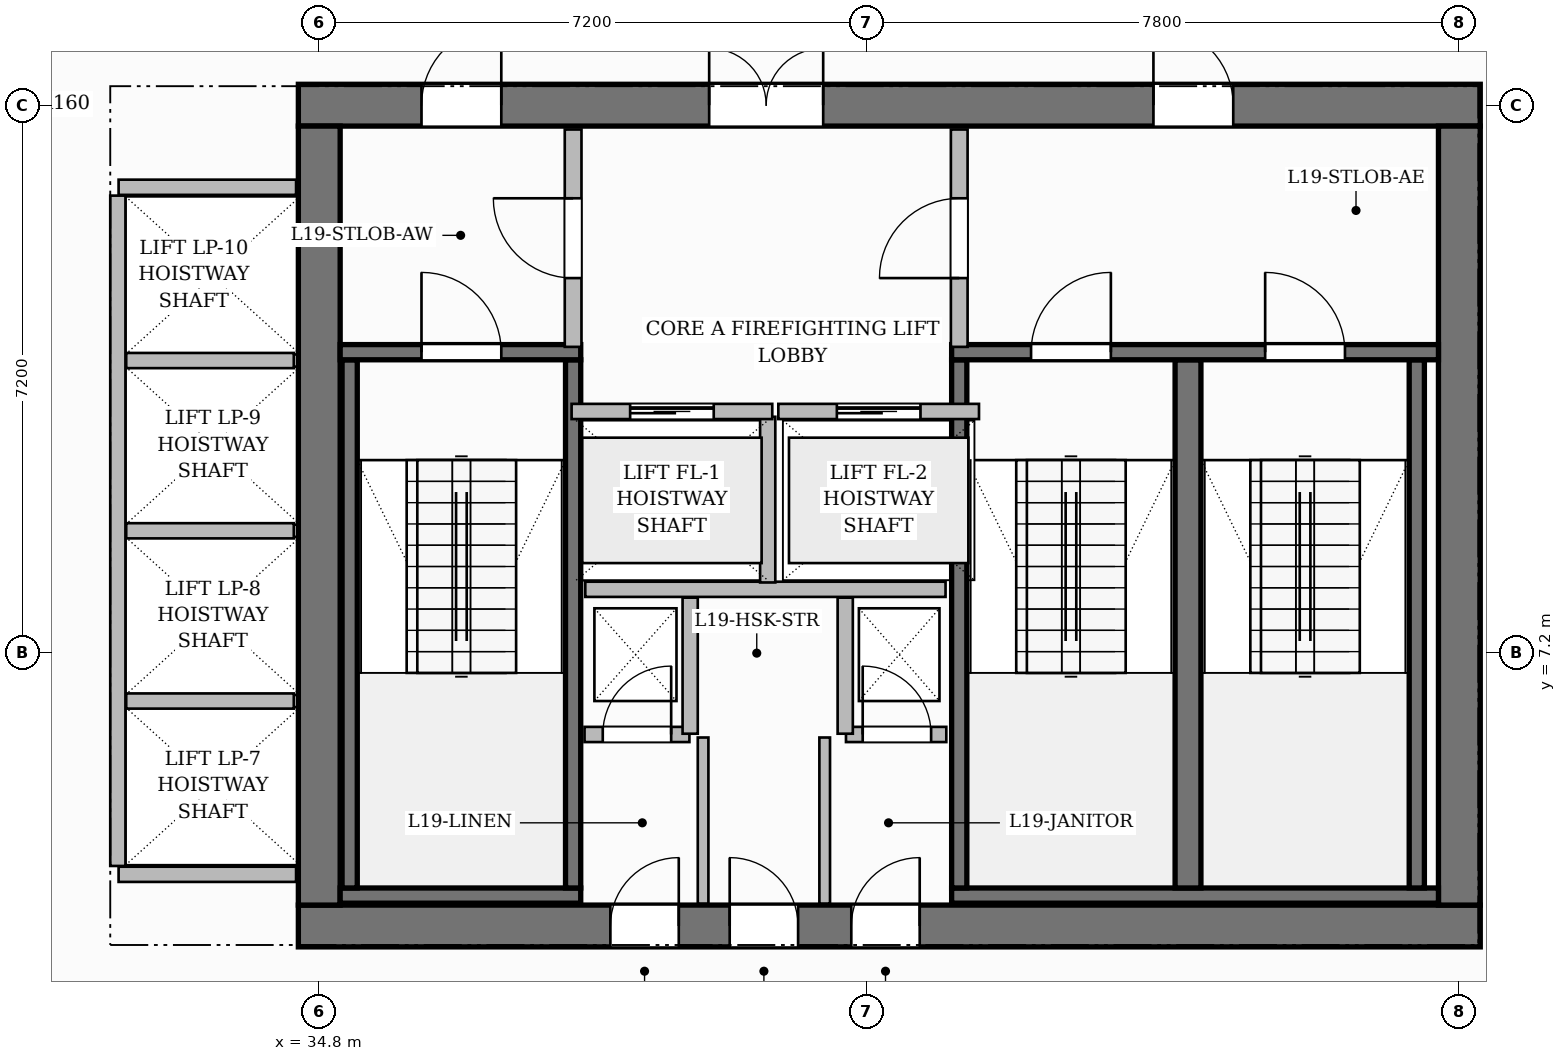
"""IFC4 building model, lengths in metres.
Left out: names, types, materials, properties, quantities, classifications, styles, units other than length and angle.
Written with IfcOpenShell. Run it as: python <this file> out.ifc"""

import sys

from ifc_helpers import new_model, si_unit, direction, frame, frame_2d, origin, place, context, subcontext, project, spatial, rectangle, extrude, source, transform, mapped, element, fill, save


model = new_model("IFC4")
c1 = context("Model", 3, precision=1e-05, world=origin(), true_north=direction((0.0, 1.0)))
c2 = subcontext(c1, "Body", "Model", "MODEL_VIEW")
j1 = project(units=[si_unit("LENGTHUNIT", "METRE"), si_unit("PLANEANGLEUNIT", "RADIAN")], contexts=[c1])
p1 = place(None, origin())
s1 = spatial("IfcSite", under=j1, at=p1, CompositionType="ELEMENT")
p2 = place(p1, origin())
s2 = spatial("IfcBuilding", under=s1, at=p2, CompositionType="ELEMENT")
p3 = place(p2, frame((0.0, 0.0, 80.5)))
s3 = spatial("IfcBuildingStorey", under=s2, at=p3, CompositionType="ELEMENT", Elevation=80.5)
p4 = place(p3, frame((34.525, 3.6, 0.0), z_axis=(0.0, 0.0, 1.0), x_axis=(1.0, 0.0, 0.0)))
e1 = element("IfcWall", 1, at=p4, inside=s3, PredefinedType="SHEAR", context=c2, shape_type="SweptSolid", body=[
    extrude(rectangle(XDim=15.55, YDim=0.55, at=frame_2d((7.775, 0.0))), origin(), (0.0, 0.0, 1.0), 3.7),
])
p5 = place(p4, frame((4.105, 0.0, 0.0)))
e2 = element("IfcOpeningElement", 2, at=p5, cuts=e1, PredefinedType="OPENING", context=c2, shape_type="SweptSolid", body=[
    extrude(rectangle(XDim=0.9, YDim=2.1, at=frame_2d((0.45, 1.05))), frame((0.0, 0.285, 0.0), z_axis=(0.0, -1.0, 0.0), x_axis=(1.0, 0.0, 0.0)), (0.0, 0.0, 1.0), 0.57),
])
p6 = place(p4, frame((5.675, 0.0, 0.0)))
e3 = element("IfcOpeningElement", 3, at=p6, cuts=e1, PredefinedType="OPENING", context=c2, shape_type="SweptSolid", body=[
    extrude(rectangle(XDim=0.9, YDim=2.1, at=frame_2d((0.45, 1.05))), frame((0.0, 0.285, 0.0), z_axis=(0.0, -1.0, 0.0), x_axis=(1.0, 0.0, 0.0)), (0.0, 0.0, 1.0), 0.57),
])
p7 = place(p4, frame((7.275, 0.0, 0.0)))
e4 = element("IfcOpeningElement", 4, at=p7, cuts=e1, PredefinedType="OPENING", context=c2, shape_type="SweptSolid", body=[
    extrude(rectangle(XDim=0.9, YDim=2.1, at=frame_2d((0.45, 1.05))), frame((0.0, 0.285, 0.0), z_axis=(0.0, -1.0, 0.0), x_axis=(1.0, 0.0, 0.0)), (0.0, 0.0, 1.0), 0.57),
])
p8 = place(p3, frame((34.525, 14.4, 0.0), z_axis=(0.0, 0.0, 1.0), x_axis=(1.0, 0.0, 0.0)))
e5 = element("IfcWall", 5, at=p8, inside=s3, PredefinedType="SHEAR", context=c2, shape_type="SweptSolid", body=[
    extrude(rectangle(XDim=15.55, YDim=0.55, at=frame_2d((7.775, 0.0))), origin(), (0.0, 0.0, 1.0), 3.7),
])
p9 = place(p8, frame((5.405, 0.0, 0.0)))
e6 = element("IfcOpeningElement", 6, at=p9, cuts=e5, PredefinedType="OPENING", context=c2, shape_type="SweptSolid", body=[
    extrude(rectangle(XDim=1.5, YDim=2.2, at=frame_2d((0.75, 1.1))), frame((0.0, 0.285, 0.0), z_axis=(0.0, -1.0, 0.0), x_axis=(1.0, 0.0, 0.0)), (0.0, 0.0, 1.0), 0.57),
])
p10 = place(p8, frame((1.62, 0.0, 0.0)))
e7 = element("IfcOpeningElement", 7, at=p10, cuts=e5, PredefinedType="OPENING", context=c2, shape_type="SweptSolid", body=[
    extrude(rectangle(XDim=1.05, YDim=2.15, at=frame_2d((0.525, 1.075))), frame((0.0, 0.285, 0.0), z_axis=(0.0, -1.0, 0.0), x_axis=(1.0, 0.0, 0.0)), (0.0, 0.0, 1.0), 0.57),
])
p11 = place(p8, frame((11.25, 0.0, 0.0)))
e8 = element("IfcOpeningElement", 8, at=p11, cuts=e5, PredefinedType="OPENING", context=c2, shape_type="SweptSolid", body=[
    extrude(rectangle(XDim=1.05, YDim=2.15, at=frame_2d((0.525, 1.075))), frame((0.0, 0.285, 0.0), z_axis=(0.0, -1.0, 0.0), x_axis=(1.0, 0.0, 0.0)), (0.0, 0.0, 1.0), 0.57),
])
for number, where, z_axis, x_axis in (
    (9, (34.8, 3.875, 0.0), (0.0, 0.0, 1.0), (0.0, 1.0, 0.0)),
    (10, (49.8, 3.875, 0.0), (0.0, 0.0, 1.0), (0.0, 1.0, 0.0)),
):
    element("IfcWall", number, at=place(p3, frame(where, z_axis=z_axis, x_axis=x_axis)), inside=s3, PredefinedType="SHEAR", context=c2, shape_type="SweptSolid", body=[
        extrude(rectangle(XDim=10.25, YDim=0.55, at=frame_2d((5.125, 0.0))), origin(), (0.0, 0.0, 1.0), 3.7),
    ])
p12 = place(p3, frame((35.075, 4.0, 0.0), z_axis=(0.0, 0.0, 1.0), x_axis=(1.0, 0.0, 0.0)))
e11 = element("IfcWall", 11, at=p12, inside=s3, PredefinedType="SHEAR", context=c2, shape_type="SweptSolid", body=[
    extrude(rectangle(XDim=3.165, YDim=0.2, at=frame_2d((1.583, 0.0))), origin(), (0.0, 0.0, 1.0), 3.7),
])
for number, where, z_axis, x_axis in (
    (12, (35.2, 4.1, 0.0), (0.0, 0.0, 1.0), (0.0, 1.0, 0.0)),
    (13, (38.14, 4.1, 0.0), (0.0, 0.0, 1.0), (0.0, 1.0, 0.0)),
):
    element("IfcWall", number, at=place(p3, frame(where, z_axis=z_axis, x_axis=x_axis)), inside=s3, PredefinedType="SHEAR", context=c2, shape_type="SweptSolid", body=[
        extrude(rectangle(XDim=6.95, YDim=0.2, at=frame_2d((3.475, 0.0))), origin(), (0.0, 0.0, 1.0), 3.7),
    ])
p13 = place(p3, frame((35.075, 11.15, 0.0), z_axis=(0.0, 0.0, 1.0), x_axis=(1.0, 0.0, 0.0)))
e14 = element("IfcWall", 14, at=p13, inside=s3, PredefinedType="SHEAR", context=c2, shape_type="SweptSolid", body=[
    extrude(rectangle(XDim=3.165, YDim=0.2, at=frame_2d((1.583, 0.0))), origin(), (0.0, 0.0, 1.0), 3.7),
])
p14 = place(p13, frame((1.07, 0.0, 0.0)))
e15 = element("IfcOpeningElement", 15, at=p14, cuts=e14, PredefinedType="OPENING", context=c2, shape_type="SweptSolid", body=[
    extrude(rectangle(XDim=1.05, YDim=2.2, at=frame_2d((0.525, 1.1))), frame((0.0, 0.11, 0.0), z_axis=(0.0, -1.0, 0.0), x_axis=(1.0, 0.0, 0.0)), (0.0, 0.0, 1.0), 0.22),
])
p15 = place(p3, frame((43.12, 4.0, 0.0), z_axis=(0.0, 0.0, 1.0), x_axis=(1.0, 0.0, 0.0)))
e16 = element("IfcWall", 16, at=p15, inside=s3, PredefinedType="SHEAR", context=c2, shape_type="SweptSolid", body=[
    extrude(rectangle(XDim=6.405, YDim=0.2, at=frame_2d((3.202, 0.0))), origin(), (0.0, 0.0, 1.0), 3.7),
])
p16 = place(p3, frame((43.22, 4.1, 0.0), z_axis=(0.0, 0.0, 1.0), x_axis=(0.0, 1.0, 0.0)))
e17 = element("IfcWall", 17, at=p16, inside=s3, PredefinedType="SHEAR", context=c2, shape_type="SweptSolid", body=[
    extrude(rectangle(XDim=6.95, YDim=0.2, at=frame_2d((3.475, 0.0))), origin(), (0.0, 0.0, 1.0), 3.7),
])
p17 = place(p3, frame((46.23, 4.1, 0.0), z_axis=(0.0, 0.0, 1.0), x_axis=(0.0, 1.0, 0.0)))
e18 = element("IfcWall", 18, at=p17, inside=s3, PredefinedType="SHEAR", context=c2, shape_type="SweptSolid", body=[
    extrude(rectangle(XDim=6.95, YDim=0.34, at=frame_2d((3.475, 0.0))), origin(), (0.0, 0.0, 1.0), 3.7),
])
p18 = place(p3, frame((49.24, 4.1, 0.0), z_axis=(0.0, 0.0, 1.0), x_axis=(0.0, 1.0, 0.0)))
e19 = element("IfcWall", 19, at=p18, inside=s3, PredefinedType="SHEAR", context=c2, shape_type="SweptSolid", body=[
    extrude(rectangle(XDim=6.95, YDim=0.2, at=frame_2d((3.475, 0.0))), origin(), (0.0, 0.0, 1.0), 3.7),
])
p19 = place(p3, frame((43.12, 11.15, 0.0), z_axis=(0.0, 0.0, 1.0), x_axis=(1.0, 0.0, 0.0)))
e20 = element("IfcWall", 20, at=p19, inside=s3, PredefinedType="SHEAR", context=c2, shape_type="SweptSolid", body=[
    extrude(rectangle(XDim=6.405, YDim=0.2, at=frame_2d((3.202, 0.0))), origin(), (0.0, 0.0, 1.0), 3.7),
])
p20 = place(p19, frame((1.045, 0.0, 0.0)))
e21 = element("IfcOpeningElement", 21, at=p20, cuts=e20, PredefinedType="OPENING", context=c2, shape_type="SweptSolid", body=[
    extrude(rectangle(XDim=1.05, YDim=2.2, at=frame_2d((0.525, 1.1))), frame((0.0, 0.11, 0.0), z_axis=(0.0, -1.0, 0.0), x_axis=(1.0, 0.0, 0.0)), (0.0, 0.0, 1.0), 0.22),
])
p21 = place(p19, frame((4.125, 0.0, 0.0)))
e22 = element("IfcOpeningElement", 22, at=p21, cuts=e20, PredefinedType="OPENING", context=c2, shape_type="SweptSolid", body=[
    extrude(rectangle(XDim=1.05, YDim=2.2, at=frame_2d((0.525, 1.1))), frame((0.0, 0.11, 0.0), z_axis=(0.0, -1.0, 0.0), x_axis=(1.0, 0.0, 0.0)), (0.0, 0.0, 1.0), 0.22),
])
p22 = place(p3, frame((38.3, 8.03, 0.0), z_axis=(0.0, 0.0, 1.0), x_axis=(1.0, 0.0, 0.0)))
e23 = element("IfcWall", 23, at=p22, inside=s3, PredefinedType="PARTITIONING", context=c2, shape_type="SweptSolid", body=[
    extrude(rectangle(XDim=4.74, YDim=0.2, at=frame_2d((2.37, 0.0))), origin(), (0.0, 0.0, 1.0), 3.45),
])
p23 = place(p3, frame((40.7, 8.12, 0.0), z_axis=(0.0, 0.0, 1.0), x_axis=(0.0, 1.0, 0.0)))
e24 = element("IfcWall", 24, at=p23, inside=s3, PredefinedType="PARTITIONING", context=c2, shape_type="SweptSolid", body=[
    extrude(rectangle(XDim=2.18, YDim=0.2, at=frame_2d((1.09, 0.0))), origin(), (0.0, 0.0, 1.0), 3.45),
])
p24 = place(p3, frame((38.14, 11.22, 0.0), z_axis=(0.0, 0.0, 1.0), x_axis=(0.0, 1.0, 0.0)))
e25 = element("IfcWall", 25, at=p24, inside=s3, PredefinedType="PARTITIONING", context=c2, shape_type="SweptSolid", body=[
    extrude(rectangle(XDim=2.86, YDim=0.22, at=frame_2d((1.43, 0.0))), origin(), (0.0, 0.0, 1.0), 3.45),
])
p25 = place(p24, frame((0.905, 0.0, 0.0)))
e26 = element("IfcOpeningElement", 26, at=p25, cuts=e25, PredefinedType="OPENING", context=c2, shape_type="SweptSolid", body=[
    extrude(rectangle(XDim=1.05, YDim=2.15, at=frame_2d((0.525, 1.075))), frame((0.0, 0.12, 0.0), z_axis=(0.0, -1.0, 0.0), x_axis=(1.0, 0.0, 0.0)), (0.0, 0.0, 1.0), 0.24),
])
p26 = place(p3, frame((43.22, 11.22, 0.0), z_axis=(0.0, 0.0, 1.0), x_axis=(0.0, 1.0, 0.0)))
e27 = element("IfcWall", 27, at=p26, inside=s3, PredefinedType="PARTITIONING", context=c2, shape_type="SweptSolid", body=[
    extrude(rectangle(XDim=2.86, YDim=0.22, at=frame_2d((1.43, 0.0))), origin(), (0.0, 0.0, 1.0), 3.45),
])
p27 = place(p26, frame((0.905, 0.0, 0.0)))
e28 = element("IfcOpeningElement", 28, at=p27, cuts=e27, PredefinedType="OPENING", context=c2, shape_type="SweptSolid", body=[
    extrude(rectangle(XDim=1.05, YDim=2.15, at=frame_2d((0.525, 1.075))), frame((0.0, 0.12, 0.0), z_axis=(0.0, -1.0, 0.0), x_axis=(1.0, 0.0, 0.0)), (0.0, 0.0, 1.0), 0.24),
])
p28 = place(p3, frame((38.29, 6.12, 0.0), z_axis=(0.0, 0.0, 1.0), x_axis=(1.0, 0.0, 0.0)))
e29 = element("IfcWall", 29, at=p28, inside=s3, PredefinedType="PARTITIONING", context=c2, shape_type="SweptSolid", body=[
    extrude(rectangle(XDim=1.38, YDim=0.2, at=frame_2d((0.69, 0.0))), origin(), (0.0, 0.0, 1.0), 3.45),
])
p29 = place(p28, frame((0.24, 0.0, 0.0)))
e30 = element("IfcOpeningElement", 30, at=p29, cuts=e29, PredefinedType="OPENING", context=c2, shape_type="SweptSolid", body=[
    extrude(rectangle(XDim=0.9, YDim=2.1, at=frame_2d((0.45, 1.05))), frame((0.0, 0.11, 0.0), z_axis=(0.0, -1.0, 0.0), x_axis=(1.0, 0.0, 0.0)), (0.0, 0.0, 1.0), 0.22),
])
p30 = place(p3, frame((39.68, 6.13, 0.0), z_axis=(0.0, 0.0, 1.0), x_axis=(0.0, 1.0, 0.0)))
e31 = element("IfcWall", 31, at=p30, inside=s3, PredefinedType="PARTITIONING", context=c2, shape_type="SweptSolid", body=[
    extrude(rectangle(XDim=1.79, YDim=0.2, at=frame_2d((0.895, 0.0))), origin(), (0.0, 0.0, 1.0), 3.45),
])
p31 = place(p3, frame((41.73, 6.12, 0.0), z_axis=(0.0, 0.0, 1.0), x_axis=(1.0, 0.0, 0.0)))
e32 = element("IfcWall", 32, at=p31, inside=s3, PredefinedType="PARTITIONING", context=c2, shape_type="SweptSolid", body=[
    extrude(rectangle(XDim=1.32, YDim=0.2, at=frame_2d((0.66, 0.0))), origin(), (0.0, 0.0, 1.0), 3.45),
])
p32 = place(p31, frame((0.22, 0.0, 0.0)))
e33 = element("IfcOpeningElement", 33, at=p32, cuts=e32, PredefinedType="OPENING", context=c2, shape_type="SweptSolid", body=[
    extrude(rectangle(XDim=0.9, YDim=2.1, at=frame_2d((0.45, 1.05))), frame((0.0, 0.11, 0.0), z_axis=(0.0, -1.0, 0.0), x_axis=(1.0, 0.0, 0.0)), (0.0, 0.0, 1.0), 0.22),
])
p33 = place(p3, frame((41.72, 6.13, 0.0), z_axis=(0.0, 0.0, 1.0), x_axis=(0.0, 1.0, 0.0)))
e34 = element("IfcWall", 34, at=p33, inside=s3, PredefinedType="PARTITIONING", context=c2, shape_type="SweptSolid", body=[
    extrude(rectangle(XDim=1.79, YDim=0.2, at=frame_2d((0.895, 0.0))), origin(), (0.0, 0.0, 1.0), 3.45),
])
for number, where, z_axis, x_axis in (
    (35, (39.85, 3.895, 0.0), (0.0, 0.0, 1.0), (0.0, 1.0, 0.0)),
    (36, (41.45, 3.895, 0.0), (0.0, 0.0, 1.0), (0.0, 1.0, 0.0)),
):
    element("IfcWall", number, at=place(p3, frame(where, z_axis=z_axis, x_axis=x_axis)), inside=s3, PredefinedType="PARTITIONING", context=c2, shape_type="SweptSolid", body=[
        extrude(rectangle(XDim=2.185, YDim=0.14, at=frame_2d((1.093, 0.0))), origin(), (0.0, 0.0, 1.0), 3.45),
    ])
for number, where, z_axis, x_axis in (
    (37, (32.16, 4.28, 0.0), (0.0, 0.0, 1.0), (1.0, 0.0, 0.0)),
    (38, (32.16, 13.32, 0.0), (0.0, 0.0, 1.0), (1.0, 0.0, 0.0)),
):
    element("IfcWall", number, at=place(p3, frame(where, z_axis=z_axis, x_axis=x_axis)), inside=s3, PredefinedType="PARTITIONING", context=c2, shape_type="SweptSolid", body=[
        extrude(rectangle(XDim=2.335, YDim=0.2, at=frame_2d((1.167, 0.0))), origin(), (0.0, 0.0, 1.0), 3.45),
    ])
p34 = place(p3, frame((32.15, 4.39, 0.0), z_axis=(0.0, 0.0, 1.0), x_axis=(0.0, 1.0, 0.0)))
e39 = element("IfcWall", 39, at=p34, inside=s3, PredefinedType="PARTITIONING", context=c2, shape_type="SweptSolid", body=[
    extrude(rectangle(XDim=8.82, YDim=0.2, at=frame_2d((4.41, 0.0))), origin(), (0.0, 0.0, 1.0), 3.45),
])
for number, where, z_axis, x_axis in (
    (40, (32.26, 6.56, 0.0), (0.0, 0.0, 1.0), (1.0, 0.0, 0.0)),
    (41, (32.26, 8.8, 0.0), (0.0, 0.0, 1.0), (1.0, 0.0, 0.0)),
    (42, (32.26, 11.04, 0.0), (0.0, 0.0, 1.0), (1.0, 0.0, 0.0)),
):
    element("IfcWall", number, at=place(p3, frame(where, z_axis=z_axis, x_axis=x_axis)), inside=s3, PredefinedType="PARTITIONING", context=c2, shape_type="SweptSolid", body=[
        extrude(rectangle(XDim=2.205, YDim=0.2, at=frame_2d((1.103, 0.0))), origin(), (0.0, 0.0, 1.0), 3.45),
    ])
p35 = place(p3, frame((38.12, 10.37, 0.0), z_axis=(0.0, 0.0, 1.0), x_axis=(1.0, 0.0, 0.0)))
e43 = element("IfcWall", 43, at=p35, inside=s3, PredefinedType="PARTITIONING", context=c2, shape_type="SweptSolid", body=[
    extrude(rectangle(XDim=2.64, YDim=0.2, at=frame_2d((1.32, 0.0))), origin(), (0.0, 0.0, 1.0), 3.45),
])
p36 = place(p35, frame((0.77, 0.0, 0.0)))
e44 = element("IfcOpeningElement", 44, at=p36, cuts=e43, PredefinedType="OPENING", context=c2, shape_type="SweptSolid", body=[
    extrude(rectangle(XDim=1.1, YDim=2.2, at=frame_2d((0.55, 1.1))), frame((0.0, 0.11, 0.0), z_axis=(0.0, -1.0, 0.0), x_axis=(1.0, 0.0, 0.0)), (0.0, 0.0, 1.0), 0.22),
])
p37 = place(p3, frame((40.84, 10.37, 0.0), z_axis=(0.0, 0.0, 1.0), x_axis=(1.0, 0.0, 0.0)))
e45 = element("IfcWall", 45, at=p37, inside=s3, PredefinedType="PARTITIONING", context=c2, shape_type="SweptSolid", body=[
    extrude(rectangle(XDim=2.64, YDim=0.2, at=frame_2d((1.32, 0.0))), origin(), (0.0, 0.0, 1.0), 3.45),
])
p38 = place(p37, frame((0.77, 0.0, 0.0)))
e46 = element("IfcOpeningElement", 46, at=p38, cuts=e45, PredefinedType="OPENING", context=c2, shape_type="SweptSolid", body=[
    extrude(rectangle(XDim=1.1, YDim=2.2, at=frame_2d((0.55, 1.1))), frame((0.0, 0.11, 0.0), z_axis=(0.0, -1.0, 0.0), x_axis=(1.0, 0.0, 0.0)), (0.0, 0.0, 1.0), 0.22),
])
m1 = source(origin(), c2, "Body", "SweptSolid", [
    extrude(rectangle(XDim=1.05, YDim=2.2, at=frame_2d((0.525, 1.1))), frame((0.0, 0.025, 0.0), z_axis=(0.0, -1.0, 0.0), x_axis=(1.0, 0.0, 0.0)), (0.0, 0.0, 1.0), 0.05),
])
p39 = place(p14, origin())
e47 = element("IfcDoor", 47, at=p39, inside=s3, OperationType="SINGLE_SWING_LEFT", PredefinedType="DOOR", context=c2, shape_type="MappedRepresentation", body=[
    mapped(m1, transform((0.0, 0.0, 0.0), scale=1.0)),
])
fill(e15, e47)
p40 = place(p20, origin())
e48 = element("IfcDoor", 48, at=p40, inside=s3, OperationType="SINGLE_SWING_RIGHT", PredefinedType="DOOR", context=c2, shape_type="MappedRepresentation", body=[
    mapped(m1, transform((0.0, 0.0, 0.0), scale=1.0)),
])
fill(e21, e48)
p41 = place(p21, origin())
e49 = element("IfcDoor", 49, at=p41, inside=s3, OperationType="SINGLE_SWING_LEFT", PredefinedType="DOOR", context=c2, shape_type="MappedRepresentation", body=[
    mapped(m1, transform((0.0, 0.0, 0.0), scale=1.0)),
])
fill(e22, e49)
m2 = source(origin(), c2, "Body", "SweptSolid", [
    extrude(rectangle(XDim=1.05, YDim=2.15, at=frame_2d((0.525, 1.075))), frame((0.0, 0.025, 0.0), z_axis=(0.0, -1.0, 0.0), x_axis=(1.0, 0.0, 0.0)), (0.0, 0.0, 1.0), 0.05),
])
p42 = place(p25, origin())
e50 = element("IfcDoor", 50, at=p42, inside=s3, OperationType="SINGLE_SWING_RIGHT", PredefinedType="DOOR", context=c2, shape_type="MappedRepresentation", body=[
    mapped(m2, transform((0.0, 0.0, 0.0), scale=1.0)),
])
fill(e26, e50)
p43 = place(p27, origin())
e51 = element("IfcDoor", 51, at=p43, inside=s3, OperationType="SINGLE_SWING_LEFT", PredefinedType="DOOR", context=c2, shape_type="MappedRepresentation", body=[
    mapped(m2, transform((0.0, 0.0, 0.0), scale=1.0)),
])
fill(e28, e51)
m3 = source(origin(), c2, "Body", "SweptSolid", [
    extrude(rectangle(XDim=1.5, YDim=2.2, at=frame_2d((0.75, 1.1))), frame((0.0, 0.025, 0.0), z_axis=(0.0, -1.0, 0.0), x_axis=(1.0, 0.0, 0.0)), (0.0, 0.0, 1.0), 0.05),
])
p44 = place(p9, origin())
e52 = element("IfcDoor", 52, at=p44, inside=s3, OperationType="DOUBLE_DOOR_SINGLE_SWING", PredefinedType="DOOR", context=c2, shape_type="MappedRepresentation", body=[
    mapped(m3, transform((0.0, 0.0, 0.0), scale=1.0)),
])
fill(e6, e52)
p45 = place(p10, origin())
e53 = element("IfcDoor", 53, at=p45, inside=s3, OperationType="SINGLE_SWING_RIGHT", PredefinedType="DOOR", context=c2, shape_type="MappedRepresentation", body=[
    mapped(m2, transform((0.0, 0.0, 0.0), scale=1.0)),
])
fill(e7, e53)
p46 = place(p11, origin())
e54 = element("IfcDoor", 54, at=p46, inside=s3, OperationType="SINGLE_SWING_LEFT", PredefinedType="DOOR", context=c2, shape_type="MappedRepresentation", body=[
    mapped(m2, transform((0.0, 0.0, 0.0), scale=1.0)),
])
fill(e8, e54)
m4 = source(origin(), c2, "Body", "SweptSolid", [
    extrude(rectangle(XDim=0.9, YDim=2.1, at=frame_2d((0.45, 1.05))), frame((0.0, 0.025, 0.0), z_axis=(0.0, -1.0, 0.0), x_axis=(1.0, 0.0, 0.0)), (0.0, 0.0, 1.0), 0.05),
])
p47 = place(p29, origin())
e55 = element("IfcDoor", 55, at=p47, inside=s3, OperationType="SINGLE_SWING_RIGHT", PredefinedType="DOOR", context=c2, shape_type="MappedRepresentation", body=[
    mapped(m4, transform((0.0, 0.0, 0.0), scale=1.0)),
])
fill(e30, e55)
p48 = place(p32, origin())
e56 = element("IfcDoor", 56, at=p48, inside=s3, OperationType="SINGLE_SWING_LEFT", PredefinedType="DOOR", context=c2, shape_type="MappedRepresentation", body=[
    mapped(m4, transform((0.0, 0.0, 0.0), scale=1.0)),
])
fill(e33, e56)
p49 = place(p5, origin())
e57 = element("IfcDoor", 57, at=p49, inside=s3, OperationType="SINGLE_SWING_RIGHT", PredefinedType="DOOR", context=c2, shape_type="MappedRepresentation", body=[
    mapped(m4, transform((0.0, 0.0, 0.0), scale=1.0)),
])
fill(e2, e57)
p50 = place(p6, origin())
e58 = element("IfcDoor", 58, at=p50, inside=s3, OperationType="SINGLE_SWING_LEFT", PredefinedType="DOOR", context=c2, shape_type="MappedRepresentation", body=[
    mapped(m4, transform((0.0, 0.0, 0.0), scale=1.0)),
])
fill(e3, e58)
p51 = place(p7, origin())
e59 = element("IfcDoor", 59, at=p51, inside=s3, OperationType="SINGLE_SWING_RIGHT", PredefinedType="DOOR", context=c2, shape_type="MappedRepresentation", body=[
    mapped(m4, transform((0.0, 0.0, 0.0), scale=1.0)),
])
fill(e4, e59)
m5 = source(origin(), c2, "Body", "SweptSolid", [
    extrude(rectangle(XDim=1.1, YDim=2.2, at=frame_2d((0.55, 1.1))), frame((0.0, 0.025, 0.0), z_axis=(0.0, -1.0, 0.0), x_axis=(1.0, 0.0, 0.0)), (0.0, 0.0, 1.0), 0.05),
])
p52 = place(p36, origin())
e60 = element("IfcDoor", 60, at=p52, inside=s3, OperationType="SLIDING_TO_LEFT", PredefinedType="DOOR", context=c2, shape_type="MappedRepresentation", body=[
    mapped(m5, transform((0.0, 0.0, 0.0), scale=1.0)),
])
fill(e44, e60)
p53 = place(p38, origin())
e61 = element("IfcDoor", 61, at=p53, inside=s3, OperationType="SLIDING_TO_LEFT", PredefinedType="DOOR", context=c2, shape_type="MappedRepresentation", body=[
    mapped(m5, transform((0.0, 0.0, 0.0), scale=1.0)),
])
fill(e46, e61)
save(model, sys.argv[1])
